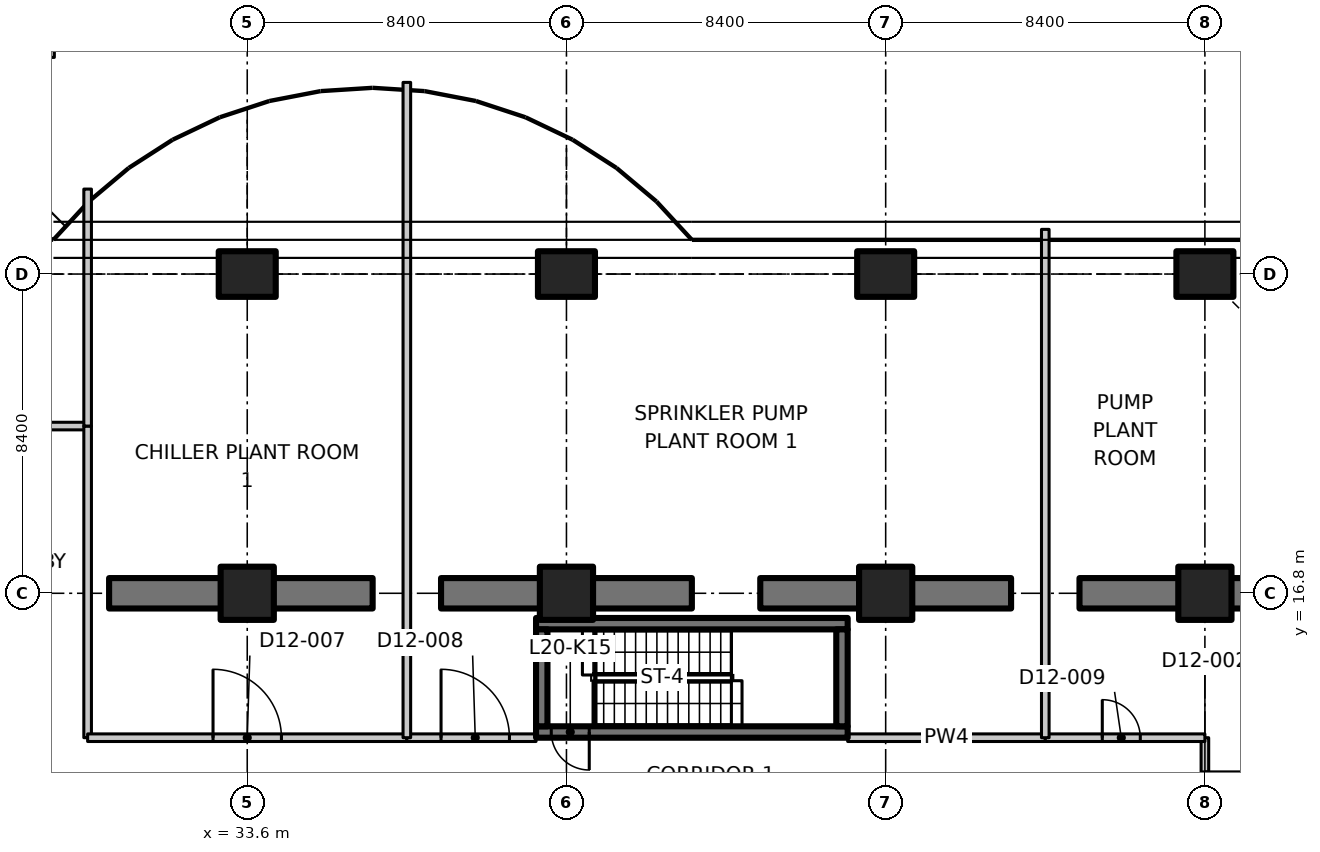
"""IFC4 building model, lengths in metres.
Left out: names, types, materials, properties, quantities, classifications, styles, units other than length and angle.
Written with IfcOpenShell. Run it as: python <this file> out.ifc"""

import sys

from ifc_helpers import new_model, si_unit, direction, frame, frame_2d, origin, origin_2d, place, context, subcontext, project, spatial, polyline, rectangle, outline, extrude, element, fill, save


model = new_model("IFC4")
c1 = context("Model", 3, precision=1e-05, world=origin(), true_north=direction((0.0, 1.0)))
c2 = subcontext(c1, "Body", "Model", "MODEL_VIEW")
j1 = project(units=[si_unit("LENGTHUNIT", "METRE"), si_unit("PLANEANGLEUNIT", "RADIAN")], contexts=[c1])
p1 = place(None, origin())
s1 = spatial("IfcSite", under=j1, at=p1, CompositionType="ELEMENT")
p2 = place(p1, origin())
s2 = spatial("IfcBuilding", under=s1, at=p2, CompositionType="ELEMENT")
p3 = place(p2, frame((0.0, 0.0, 86.9)))
s3 = spatial("IfcBuildingStorey", under=s2, at=p3, CompositionType="ELEMENT", Elevation=86.9)
p4 = place(p3, frame((33.6, 16.8, 0.0), z_axis=(0.0, 0.0, 1.0), x_axis=(1.0, 0.0, 0.0)))
e1 = element("IfcColumn", 1, at=p4, inside=s3, PredefinedType="COLUMN", context=c2, shape_type="SweptSolid", body=[
    extrude(rectangle(XDim=1.4, YDim=1.4, at=origin_2d()), origin(), (0.0, 0.0, 1.0), 4.55),
])
p5 = place(p3, frame((33.6, 25.2, 0.0), z_axis=(0.0, 0.0, 1.0), x_axis=(0.0, 1.0, 0.0)))
e2 = element("IfcColumn", 2, at=p5, inside=s3, PredefinedType="COLUMN", context=c2, shape_type="SweptSolid", body=[
    extrude(rectangle(XDim=1.2, YDim=1.5, at=origin_2d()), origin(), (0.0, 0.0, 1.0), 4.55),
])
p6 = place(p3, frame((42.0, 16.8, 0.0), z_axis=(0.0, 0.0, 1.0), x_axis=(1.0, 0.0, 0.0)))
e3 = element("IfcColumn", 3, at=p6, inside=s3, PredefinedType="COLUMN", context=c2, shape_type="SweptSolid", body=[
    extrude(rectangle(XDim=1.4, YDim=1.4, at=origin_2d()), origin(), (0.0, 0.0, 1.0), 4.55),
])
p7 = place(p3, frame((42.0, 25.2, 0.0), z_axis=(0.0, 0.0, 1.0), x_axis=(0.0, 1.0, 0.0)))
e4 = element("IfcColumn", 4, at=p7, inside=s3, PredefinedType="COLUMN", context=c2, shape_type="SweptSolid", body=[
    extrude(rectangle(XDim=1.2, YDim=1.5, at=origin_2d()), origin(), (0.0, 0.0, 1.0), 4.55),
])
p8 = place(p3, frame((50.4, 16.8, 0.0), z_axis=(0.0, 0.0, 1.0), x_axis=(1.0, 0.0, 0.0)))
e5 = element("IfcColumn", 5, at=p8, inside=s3, PredefinedType="COLUMN", context=c2, shape_type="SweptSolid", body=[
    extrude(rectangle(XDim=1.4, YDim=1.4, at=origin_2d()), origin(), (0.0, 0.0, 1.0), 4.55),
])
p9 = place(p3, frame((50.4, 25.2, 0.0), z_axis=(0.0, 0.0, 1.0), x_axis=(0.0, 1.0, 0.0)))
e6 = element("IfcColumn", 6, at=p9, inside=s3, PredefinedType="COLUMN", context=c2, shape_type="SweptSolid", body=[
    extrude(rectangle(XDim=1.2, YDim=1.5, at=origin_2d()), origin(), (0.0, 0.0, 1.0), 4.55),
])
p10 = place(p3, frame((58.8, 16.8, 0.0), z_axis=(0.0, 0.0, 1.0), x_axis=(1.0, 0.0, 0.0)))
e7 = element("IfcColumn", 7, at=p10, inside=s3, PredefinedType="COLUMN", context=c2, shape_type="SweptSolid", body=[
    extrude(rectangle(XDim=1.4, YDim=1.4, at=origin_2d()), origin(), (0.0, 0.0, 1.0), 4.55),
])
p11 = place(p3, frame((58.8, 25.2, 0.0), z_axis=(0.0, 0.0, 1.0), x_axis=(0.0, 1.0, 0.0)))
e8 = element("IfcColumn", 8, at=p11, inside=s3, PredefinedType="COLUMN", context=c2, shape_type="SweptSolid", body=[
    extrude(rectangle(XDim=1.2, YDim=1.5, at=origin_2d()), origin(), (0.0, 0.0, 1.0), 4.55),
])
p12 = place(p3, frame((29.965, 16.8, 0.0), z_axis=(0.0, 0.0, 1.0), x_axis=(1.0, 0.0, 0.0)))
e9 = element("IfcWall", 9, at=p12, inside=s3, PredefinedType="SHEAR", context=c2, shape_type="SweptSolid", body=[
    extrude(rectangle(XDim=2.965, YDim=0.8, at=frame_2d((1.482, 0.0))), origin(), (0.0, 0.0, 1.0), 4.55),
])
p13 = place(p3, frame((34.27, 16.8, 0.0), z_axis=(0.0, 0.0, 1.0), x_axis=(1.0, 0.0, 0.0)))
e10 = element("IfcWall", 10, at=p13, inside=s3, PredefinedType="SHEAR", context=c2, shape_type="SweptSolid", body=[
    extrude(rectangle(XDim=2.63, YDim=0.8, at=frame_2d((1.315, 0.0))), origin(), (0.0, 0.0, 1.0), 4.55),
])
for number, where, z_axis, x_axis in (
    (11, (38.7, 16.8, 0.0), (0.0, 0.0, 1.0), (1.0, 0.0, 0.0)),
    (12, (42.67, 16.8, 0.0), (0.0, 0.0, 1.0), (1.0, 0.0, 0.0)),
):
    element("IfcWall", number, at=place(p3, frame(where, z_axis=z_axis, x_axis=x_axis)), inside=s3, PredefinedType="SHEAR", context=c2, shape_type="SweptSolid", body=[
        extrude(rectangle(XDim=2.63, YDim=0.8, at=frame_2d((1.315, 0.0))), origin(), (0.0, 0.0, 1.0), 4.55),
    ])
for number, where, z_axis, x_axis in (
    (13, (47.1, 16.8, 0.0), (0.0, 0.0, 1.0), (1.0, 0.0, 0.0)),
    (14, (51.07, 16.8, 0.0), (0.0, 0.0, 1.0), (1.0, 0.0, 0.0)),
    (15, (55.5, 16.8, 0.0), (0.0, 0.0, 1.0), (1.0, 0.0, 0.0)),
):
    element("IfcWall", number, at=place(p3, frame(where, z_axis=z_axis, x_axis=x_axis)), inside=s3, PredefinedType="SHEAR", context=c2, shape_type="SweptSolid", body=[
        extrude(rectangle(XDim=2.63, YDim=0.8, at=frame_2d((1.315, 0.0))), origin(), (0.0, 0.0, 1.0), 4.55),
    ])
p14 = place(p3, frame((59.47, 16.8, 0.0), z_axis=(0.0, 0.0, 1.0), x_axis=(1.0, 0.0, 0.0)))
e16 = element("IfcWall", 16, at=p14, inside=s3, PredefinedType="SHEAR", context=c2, shape_type="SweptSolid", body=[
    extrude(rectangle(XDim=2.655, YDim=0.8, at=frame_2d((1.328, 0.0))), origin(), (0.0, 0.0, 1.0), 4.55),
])
p15 = place(p3, frame((49.4, 13.15, 0.0), z_axis=(0.0, 0.0, 1.0), x_axis=(-1.0, 0.0, 0.0)))
e17 = element("IfcWall", 17, at=p15, inside=s3, PredefinedType="SHEAR", context=c2, shape_type="SweptSolid", body=[
    extrude(rectangle(XDim=8.2, YDim=0.3, at=frame_2d((4.1, 0.0))), origin(), (0.0, 0.0, 1.0), 4.55),
])
p16 = place(p15, frame((6.8, 0.0, 0.0)))
e18 = element("IfcOpeningElement", 18, at=p16, cuts=e17, PredefinedType="OPENING", context=c2, shape_type="SweptSolid", body=[
    extrude(rectangle(XDim=1.0, YDim=2.1, at=frame_2d((0.5, 1.05))), frame((0.0, 0.16, 0.0), z_axis=(0.0, -1.0, 0.0), x_axis=(1.0, 0.0, 0.0)), (0.0, 0.0, 1.0), 0.32),
])
p17 = place(p3, frame((41.2, 16.0, 0.0), z_axis=(0.0, 0.0, 1.0), x_axis=(1.0, 0.0, 0.0)))
e19 = element("IfcWall", 19, at=p17, inside=s3, PredefinedType="SHEAR", context=c2, shape_type="SweptSolid", body=[
    extrude(rectangle(XDim=8.2, YDim=0.3, at=frame_2d((4.1, 0.0))), origin(), (0.0, 0.0, 1.0), 4.55),
])
for number, where, z_axis, x_axis in (
    (20, (41.35, 13.3, 0.0), (0.0, 0.0, 1.0), (0.0, 1.0, 0.0)),
    (21, (49.25, 13.3, 0.0), (0.0, 0.0, 1.0), (0.0, 1.0, 0.0)),
):
    element("IfcWall", number, at=place(p3, frame(where, z_axis=z_axis, x_axis=x_axis)), inside=s3, PredefinedType="SHEAR", context=c2, shape_type="SweptSolid", body=[
        extrude(rectangle(XDim=2.55, YDim=0.3, at=frame_2d((1.275, 0.0))), origin(), (0.0, 0.0, 1.0), 4.55),
    ])
p18 = place(p3, frame((25.2, 21.2, 0.0), z_axis=(0.0, 0.0, 1.0), x_axis=(1.0, 0.0, 0.0)))
e22 = element("IfcWall", 22, at=p18, inside=s3, PredefinedType="PARTITIONING", context=c2, shape_type="SweptSolid", body=[
    extrude(rectangle(XDim=4.2, YDim=0.2, at=frame_2d((2.1, 0.0))), origin(), (0.0, 0.0, 1.0), 4.53),
])
p19 = place(p3, frame((29.4, 21.2, 0.0), z_axis=(0.0, 0.0, 1.0), x_axis=(0.0, -1.0, 0.0)))
e23 = element("IfcWall", 23, at=p19, inside=s3, PredefinedType="PARTITIONING", context=c2, shape_type="SweptSolid", body=[
    extrude(rectangle(XDim=8.2, YDim=0.2, at=frame_2d((4.1, 0.0))), origin(), (0.0, 0.0, 1.0), 4.53),
])
p20 = place(p3, frame((29.4, 27.436, 0.0), z_axis=(0.0, 0.0, 1.0), x_axis=(0.0, -1.0, 0.0)))
e24 = element("IfcWall", 24, at=p20, inside=s3, PredefinedType="PARTITIONING", context=c2, shape_type="SweptSolid", body=[
    extrude(outline(polyline([(0.0, 0.0), (6.236, 0.0), (6.236, 4.53), (2.686, 4.53), (2.684, 4.18), (1.788, 4.18), (1.786, 4.53), (0.161, 4.53), (0.0, 4.53), (0.0, 0.0)])), frame((0.0, 0.1, 0.0), z_axis=(0.0, -1.0, 0.0), x_axis=(1.0, 0.0, 0.0)), (0.0, 0.0, 1.0), 0.2),
])
p21 = place(p3, frame((25.2, 31.0, 0.0), z_axis=(0.0, 0.0, 1.0), x_axis=(1.0, 0.0, 0.0)))
e25 = element("IfcWall", 25, at=p21, inside=s3, PredefinedType="PARTITIONING", context=c2, shape_type="SweptSolid", body=[
    extrude(rectangle(XDim=3.324, YDim=0.2, at=frame_2d((1.662, 0.0))), origin(), (0.0, 0.0, 1.0), 4.18),
])
p22 = place(p3, frame((58.8, 13.0, 0.0), z_axis=(0.0, 0.0, 1.0), x_axis=(0.0, -1.0, 0.0)))
e26 = element("IfcWall", 26, at=p22, inside=s3, PredefinedType="PARTITIONING", context=c2, shape_type="SweptSolid", body=[
    extrude(rectangle(XDim=3.4, YDim=0.2, at=frame_2d((1.7, 0.0))), origin(), (0.0, 0.0, 1.0), 4.53),
])
p23 = place(p22, frame((0.9, 0.0, 0.0)))
e27 = element("IfcOpeningElement", 27, at=p23, cuts=e26, PredefinedType="OPENING", context=c2, shape_type="SweptSolid", body=[
    extrude(rectangle(XDim=1.8, YDim=2.1, at=frame_2d((0.9, 1.05))), frame((0.0, 0.11, 0.0), z_axis=(0.0, -1.0, 0.0), x_axis=(1.0, 0.0, 0.0)), (0.0, 0.0, 1.0), 0.22),
])
p24 = place(p3, frame((29.4, 13.0, 0.0), z_axis=(0.0, 0.0, 1.0), x_axis=(1.0, 0.0, 0.0)))
e28 = element("IfcWall", 28, at=p24, inside=s3, PredefinedType="PARTITIONING", context=c2, shape_type="SweptSolid", body=[
    extrude(rectangle(XDim=8.4, YDim=0.2, at=frame_2d((4.2, 0.0))), origin(), (0.0, 0.0, 1.0), 4.53),
])
p25 = place(p24, frame((3.3, 0.0, 0.0)))
e29 = element("IfcOpeningElement", 29, at=p25, cuts=e28, PredefinedType="OPENING", context=c2, shape_type="SweptSolid", body=[
    extrude(rectangle(XDim=1.8, YDim=2.1, at=frame_2d((0.9, 1.05))), frame((0.0, 0.11, 0.0), z_axis=(0.0, -1.0, 0.0), x_axis=(1.0, 0.0, 0.0)), (0.0, 0.0, 1.0), 0.22),
])
p26 = place(p3, frame((37.8, 13.0, 0.0), z_axis=(0.0, 0.0, 1.0), x_axis=(1.0, 0.0, 0.0)))
e30 = element("IfcWall", 30, at=p26, inside=s3, PredefinedType="PARTITIONING", context=c2, shape_type="SweptSolid", body=[
    extrude(rectangle(XDim=3.4, YDim=0.2, at=frame_2d((1.7, 0.0))), origin(), (0.0, 0.0, 1.0), 4.53),
])
p27 = place(p26, frame((0.9, 0.0, 0.0)))
e31 = element("IfcOpeningElement", 31, at=p27, cuts=e30, PredefinedType="OPENING", context=c2, shape_type="SweptSolid", body=[
    extrude(rectangle(XDim=1.8, YDim=2.1, at=frame_2d((0.9, 1.05))), frame((0.0, 0.11, 0.0), z_axis=(0.0, -1.0, 0.0), x_axis=(1.0, 0.0, 0.0)), (0.0, 0.0, 1.0), 0.22),
])
p28 = place(p3, frame((49.4, 13.0, 0.0), z_axis=(0.0, 0.0, 1.0), x_axis=(1.0, 0.0, 0.0)))
e32 = element("IfcWall", 32, at=p28, inside=s3, PredefinedType="PARTITIONING", context=c2, shape_type="SweptSolid", body=[
    extrude(rectangle(XDim=5.2, YDim=0.2, at=frame_2d((2.6, 0.0))), origin(), (0.0, 0.0, 1.0), 4.53),
])
p29 = place(p3, frame((54.6, 13.0, 0.0), z_axis=(0.0, 0.0, 1.0), x_axis=(1.0, 0.0, 0.0)))
e33 = element("IfcWall", 33, at=p29, inside=s3, PredefinedType="PARTITIONING", context=c2, shape_type="SweptSolid", body=[
    extrude(rectangle(XDim=4.2, YDim=0.2, at=frame_2d((2.1, 0.0))), origin(), (0.0, 0.0, 1.0), 4.53),
])
p30 = place(p29, frame((1.5, 0.0, 0.0)))
e34 = element("IfcOpeningElement", 34, at=p30, cuts=e33, PredefinedType="OPENING", context=c2, shape_type="SweptSolid", body=[
    extrude(rectangle(XDim=1.0, YDim=2.1, at=frame_2d((0.5, 1.05))), frame((0.0, 0.11, 0.0), z_axis=(0.0, -1.0, 0.0), x_axis=(1.0, 0.0, 0.0)), (0.0, 0.0, 1.0), 0.22),
])
p31 = place(p3, frame((37.8, 30.243, 0.0), z_axis=(0.0, 0.0, 1.0), x_axis=(0.0, -1.0, 0.0)))
e35 = element("IfcWall", 35, at=p31, inside=s3, PredefinedType="PARTITIONING", context=c2, shape_type="SweptSolid", body=[
    extrude(outline(polyline([(0.0, 0.0), (17.243, 0.0), (17.243, 4.53), (5.493, 4.53), (5.491, 4.18), (4.595, 4.18), (4.593, 4.53), (0.0, 4.53), (0.0, 0.0)])), frame((0.0, 0.1, 0.0), z_axis=(0.0, -1.0, 0.0), x_axis=(1.0, 0.0, 0.0)), (0.0, 0.0, 1.0), 0.2),
])
p32 = place(p3, frame((54.6, 26.375, 0.0), z_axis=(0.0, 0.0, 1.0), x_axis=(0.0, -1.0, 0.0)))
e36 = element("IfcWall", 36, at=p32, inside=s3, PredefinedType="PARTITIONING", context=c2, shape_type="SweptSolid", body=[
    extrude(outline(polyline([(0.0, 0.0), (13.375, 0.0), (13.375, 4.53), (1.625, 4.53), (1.624, 4.18), (0.728, 4.18), (0.726, 4.53), (0.075, 4.53), (0.0, 4.53), (0.0, 0.0)])), frame((0.0, 0.1, 0.0), z_axis=(0.0, -1.0, 0.0), x_axis=(1.0, 0.0, 0.0)), (0.0, 0.0, 1.0), 0.2),
])
p33 = place(p16, origin())
e37 = element("IfcDoor", 37, at=p33, inside=s3, OperationType="SINGLE_SWING_LEFT", PredefinedType="DOOR", context=c2, shape_type="SweptSolid", body=[
    extrude(rectangle(XDim=1.0, YDim=2.1, at=frame_2d((0.5, 1.05))), frame((0.0, 0.025, 0.0), z_axis=(0.0, -1.0, 0.0), x_axis=(1.0, 0.0, 0.0)), (0.0, 0.0, 1.0), 0.05),
])
fill(e18, e37)
p34 = place(p23, origin())
e38 = element("IfcDoor", 38, at=p34, inside=s3, OperationType="DOUBLE_DOOR_SINGLE_SWING", PredefinedType="DOOR", context=c2, shape_type="SweptSolid", body=[
    extrude(rectangle(XDim=1.8, YDim=2.1, at=frame_2d((0.9, 1.05))), frame((0.0, 0.025, 0.0), z_axis=(0.0, -1.0, 0.0), x_axis=(1.0, 0.0, 0.0)), (0.0, 0.0, 1.0), 0.05),
])
fill(e27, e38)
p35 = place(p25, origin())
e39 = element("IfcDoor", 39, at=p35, inside=s3, OperationType="DOUBLE_DOOR_SINGLE_SWING", PredefinedType="DOOR", context=c2, shape_type="SweptSolid", body=[
    extrude(rectangle(XDim=1.8, YDim=2.1, at=frame_2d((0.9, 1.05))), frame((0.0, 0.025, 0.0), z_axis=(0.0, -1.0, 0.0), x_axis=(1.0, 0.0, 0.0)), (0.0, 0.0, 1.0), 0.05),
])
fill(e29, e39)
p36 = place(p27, origin())
e40 = element("IfcDoor", 40, at=p36, inside=s3, OperationType="DOUBLE_DOOR_SINGLE_SWING", PredefinedType="DOOR", context=c2, shape_type="SweptSolid", body=[
    extrude(rectangle(XDim=1.8, YDim=2.1, at=frame_2d((0.9, 1.05))), frame((0.0, 0.025, 0.0), z_axis=(0.0, -1.0, 0.0), x_axis=(1.0, 0.0, 0.0)), (0.0, 0.0, 1.0), 0.05),
])
fill(e31, e40)
p37 = place(p30, origin())
e41 = element("IfcDoor", 41, at=p37, inside=s3, OperationType="SINGLE_SWING_LEFT", PredefinedType="DOOR", context=c2, shape_type="SweptSolid", body=[
    extrude(rectangle(XDim=1.0, YDim=2.1, at=frame_2d((0.5, 1.05))), frame((0.0, 0.025, 0.0), z_axis=(0.0, -1.0, 0.0), x_axis=(1.0, 0.0, 0.0)), (0.0, 0.0, 1.0), 0.05),
])
fill(e34, e41)
save(model, sys.argv[1])
